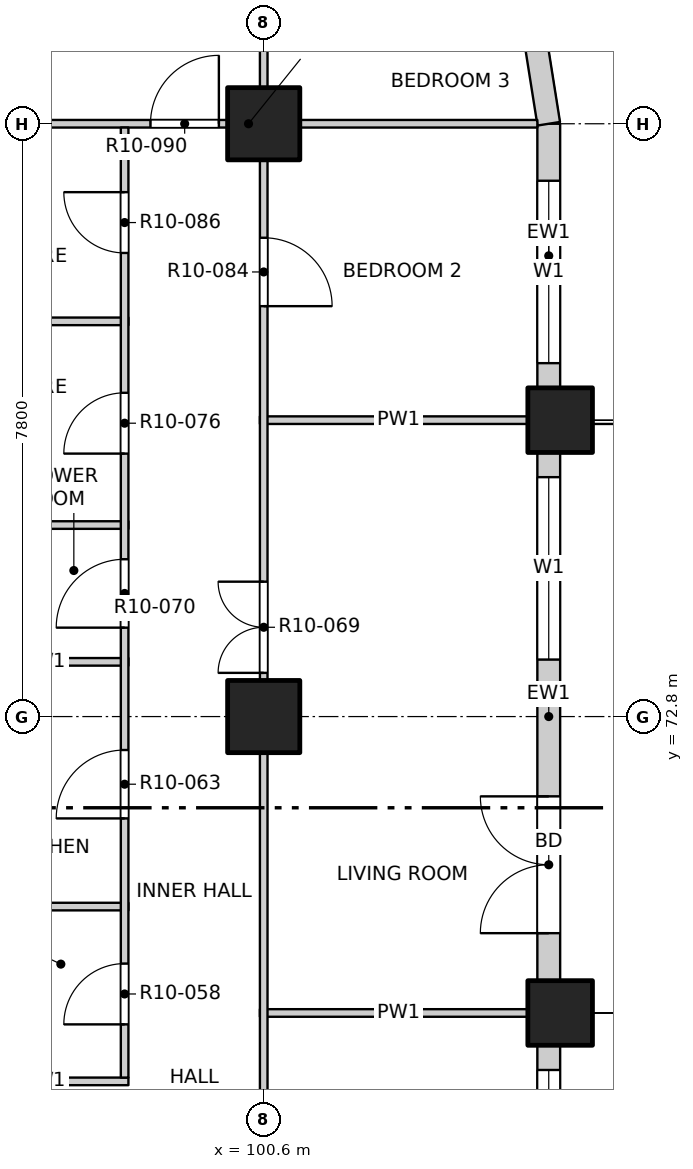
"""IFC4 building model, lengths in metres.
Left out: names, types, materials, properties, quantities, classifications, styles, units other than length and angle.
Written with IfcOpenShell. Run it as: python <this file> out.ifc"""

import sys

from ifc_helpers import new_model, si_unit, direction, frame, frame_2d, origin, origin_2d, place, context, subcontext, project, spatial, rectangle, extrude, element, fill, save


model = new_model("IFC4")
c1 = context("Model", 3, precision=1e-05, world=origin(), true_north=direction((0.0, 1.0)))
c2 = subcontext(c1, "Body", "Model", "MODEL_VIEW")
j1 = project(units=[si_unit("LENGTHUNIT", "METRE"), si_unit("PLANEANGLEUNIT", "RADIAN")], contexts=[c1])
p1 = place(None, origin())
s1 = spatial("IfcSite", under=j1, at=p1, CompositionType="ELEMENT")
p2 = place(p1, origin())
s2 = spatial("IfcBuilding", under=s1, at=p2, CompositionType="ELEMENT")
p3 = place(p2, frame((0.0, 0.0, 123.7)))
s3 = spatial("IfcBuildingStorey", under=s2, at=p3, CompositionType="ELEMENT", Elevation=123.7)
for number, where, z_axis, x_axis in (
    (1, (104.5, 68.9, -0.3), (0.0, 0.0, 1.0), (1.0, 0.0, 0.0)),
    (2, (104.5, 76.7, -0.3), (0.0, 0.0, 1.0), (1.0, 0.0, 0.0)),
):
    element("IfcColumn", number, at=place(p3, frame(where, z_axis=z_axis, x_axis=x_axis)), inside=s3, PredefinedType="COLUMN", context=c2, shape_type="SweptSolid", body=[
        extrude(rectangle(XDim=0.85, YDim=0.85, at=origin_2d()), origin(), (0.0, 0.0, 1.0), 3.45),
    ])
for number, where, z_axis, x_axis in (
    (3, (100.6, 72.8, -0.3), (0.0, 0.0, 1.0), (1.0, 0.0, 0.0)),
    (4, (100.6, 80.6, -0.3), (0.0, 0.0, 1.0), (1.0, 0.0, 0.0)),
):
    element("IfcColumn", number, at=place(p3, frame(where, z_axis=z_axis, x_axis=x_axis)), inside=s3, PredefinedType="COLUMN", context=c2, shape_type="SweptSolid", body=[
        extrude(rectangle(XDim=0.95, YDim=0.95, at=origin_2d()), origin(), (0.0, 0.0, 1.0), 3.45),
    ])
p4 = place(p3, frame((104.35, 61.525, 0.0), z_axis=(0.0, 0.0, 1.0), x_axis=(0.0, 1.0, 0.0)))
e5 = element("IfcWall", 5, at=p4, inside=s3, PredefinedType="SOLIDWALL", context=c2, shape_type="SweptSolid", body=[
    extrude(rectangle(XDim=6.95, YDim=0.3, at=frame_2d((3.475, 0.0))), origin(), (0.0, 0.0, 1.0), 2.7),
])
p5 = place(p4, frame((0.625, 0.0, 0.0)))
e6 = element("IfcOpeningElement", 6, at=p5, cuts=e5, PredefinedType="OPENING", context=c2, shape_type="SweptSolid", body=[
    extrude(rectangle(XDim=1.8, YDim=2.4, at=frame_2d((0.9, 1.2))), frame((0.0, 0.16, 0.0), z_axis=(0.0, -1.0, 0.0), x_axis=(1.0, 0.0, 0.0)), (0.0, 0.0, 1.0), 0.32),
])
p6 = place(p4, frame((4.225, 0.0, 0.9)))
e7 = element("IfcOpeningElement", 7, at=p6, cuts=e5, PredefinedType="OPENING", context=c2, shape_type="SweptSolid", body=[
    extrude(rectangle(XDim=2.4, YDim=1.8, at=frame_2d((1.2, 0.9))), frame((0.0, 0.16, 0.0), z_axis=(0.0, -1.0, 0.0), x_axis=(1.0, 0.0, 0.0)), (0.0, 0.0, 1.0), 0.32),
])
p7 = place(p3, frame((104.35, 69.325, 0.0), z_axis=(0.0, 0.0, 1.0), x_axis=(0.0, 1.0, 0.0)))
e8 = element("IfcWall", 8, at=p7, inside=s3, PredefinedType="SOLIDWALL", context=c2, shape_type="SweptSolid", body=[
    extrude(rectangle(XDim=6.95, YDim=0.3, at=frame_2d((3.475, 0.0))), origin(), (0.0, 0.0, 1.0), 2.7),
])
p8 = place(p7, frame((0.625, 0.0, 0.0)))
e9 = element("IfcOpeningElement", 9, at=p8, cuts=e8, PredefinedType="OPENING", context=c2, shape_type="SweptSolid", body=[
    extrude(rectangle(XDim=1.8, YDim=2.4, at=frame_2d((0.9, 1.2))), frame((0.0, 0.16, 0.0), z_axis=(0.0, -1.0, 0.0), x_axis=(1.0, 0.0, 0.0)), (0.0, 0.0, 1.0), 0.32),
])
p9 = place(p7, frame((4.225, 0.0, 0.9)))
e10 = element("IfcOpeningElement", 10, at=p9, cuts=e8, PredefinedType="OPENING", context=c2, shape_type="SweptSolid", body=[
    extrude(rectangle(XDim=2.4, YDim=1.8, at=frame_2d((1.2, 0.9))), frame((0.0, 0.16, 0.0), z_axis=(0.0, -1.0, 0.0), x_axis=(1.0, 0.0, 0.0)), (0.0, 0.0, 1.0), 0.32),
])
p10 = place(p3, frame((104.35, 77.125, 0.0), z_axis=(0.0, 0.0, 1.0), x_axis=(0.0, 1.0, 0.0)))
e11 = element("IfcWall", 11, at=p10, inside=s3, PredefinedType="SOLIDWALL", context=c2, shape_type="SweptSolid", body=[
    extrude(rectangle(XDim=3.475, YDim=0.3, at=frame_2d((1.738, 0.0))), origin(), (0.0, 0.0, 1.0), 2.7),
])
p11 = place(p10, frame((0.325, 0.0, 0.9)))
e12 = element("IfcOpeningElement", 12, at=p11, cuts=e11, PredefinedType="OPENING", context=c2, shape_type="SweptSolid", body=[
    extrude(rectangle(XDim=2.4, YDim=1.8, at=frame_2d((1.2, 0.9))), frame((0.0, 0.16, 0.0), z_axis=(0.0, -1.0, 0.0), x_axis=(1.0, 0.0, 0.0)), (0.0, 0.0, 1.0), 0.32),
])
p12 = place(p3, frame((104.35, 80.6, 0.0), z_axis=(0.0, 0.0, 1.0), x_axis=(-0.156496880861, 0.987678452879, 0.0)))
e13 = element("IfcWall", 13, at=p12, inside=s3, PredefinedType="SOLIDWALL", context=c2, shape_type="SweptSolid", body=[
    extrude(rectangle(XDim=1.173, YDim=0.3, at=frame_2d((0.586, 0.0))), origin(), (0.0, 0.0, 1.0), 2.7),
])
p13 = place(p3, frame((96.6, 68.0, 0.0), z_axis=(0.0, 0.0, 1.0), x_axis=(1.0, 0.0, 0.0)))
e14 = element("IfcWall", 14, at=p13, inside=s3, PredefinedType="PARTITIONING", context=c2, shape_type="SweptSolid", body=[
    extrude(rectangle(XDim=2.22, YDim=0.1, at=frame_2d((1.11, 0.0))), origin(), (0.0, 0.0, 1.0), 3.15),
])
p14 = place(p3, frame((100.55, 68.9, 0.0), z_axis=(0.0, 0.0, 1.0), x_axis=(1.0, 0.0, 0.0)))
e15 = element("IfcWall", 15, at=p14, inside=s3, PredefinedType="PARTITIONING", context=c2, shape_type="SweptSolid", body=[
    extrude(rectangle(XDim=3.65, YDim=0.1, at=frame_2d((1.825, 0.0))), origin(), (0.0, 0.0, 1.0), 2.55),
])
for number, where, z_axis, x_axis in (
    (16, (96.6, 70.3, 0.0), (0.0, 0.0, 1.0), (1.0, 0.0, 0.0)),
    (17, (96.6, 73.52, 0.0), (0.0, 0.0, 1.0), (1.0, 0.0, 0.0)),
    (18, (96.6, 75.32, 0.0), (0.0, 0.0, 1.0), (1.0, 0.0, 0.0)),
):
    element("IfcWall", number, at=place(p3, frame(where, z_axis=z_axis, x_axis=x_axis)), inside=s3, PredefinedType="PARTITIONING", context=c2, shape_type="SweptSolid", body=[
        extrude(rectangle(XDim=2.22, YDim=0.1, at=frame_2d((1.11, 0.0))), origin(), (0.0, 0.0, 1.0), 3.15),
    ])
p15 = place(p3, frame((100.55, 76.7, 0.0), z_axis=(0.0, 0.0, 1.0), x_axis=(1.0, 0.0, 0.0)))
e19 = element("IfcWall", 19, at=p15, inside=s3, PredefinedType="PARTITIONING", context=c2, shape_type="SweptSolid", body=[
    extrude(rectangle(XDim=3.65, YDim=0.1, at=frame_2d((1.825, 0.0))), origin(), (0.0, 0.0, 1.0), 2.55),
])
p16 = place(p3, frame((96.6, 78.0, 0.0), z_axis=(0.0, 0.0, 1.0), x_axis=(1.0, 0.0, 0.0)))
e20 = element("IfcWall", 20, at=p16, inside=s3, PredefinedType="PARTITIONING", context=c2, shape_type="SweptSolid", body=[
    extrude(rectangle(XDim=2.22, YDim=0.1, at=frame_2d((1.11, 0.0))), origin(), (0.0, 0.0, 1.0), 3.15),
])
p17 = place(p3, frame((96.6, 80.6, 0.0), z_axis=(0.0, 0.0, 1.0), x_axis=(1.0, 0.0, 0.0)))
e21 = element("IfcWall", 21, at=p17, inside=s3, PredefinedType="PARTITIONING", context=c2, shape_type="SweptSolid", body=[
    extrude(rectangle(XDim=7.6, YDim=0.1, at=frame_2d((3.8, 0.0))), origin(), (0.0, 0.0, 1.0), 3.15),
])
p18 = place(p17, frame((2.51, 0.0, 0.0)))
e22 = element("IfcOpeningElement", 22, at=p18, cuts=e21, PredefinedType="OPENING", context=c2, shape_type="SweptSolid", body=[
    extrude(rectangle(XDim=0.9, YDim=2.1, at=frame_2d((0.45, 1.05))), frame((0.0, 0.06, 0.0), z_axis=(0.0, -1.0, 0.0), x_axis=(1.0, 0.0, 0.0)), (0.0, 0.0, 1.0), 0.12),
])
p19 = place(p3, frame((98.77, 68.05, 0.0), z_axis=(0.0, 0.0, 1.0), x_axis=(0.0, 1.0, 0.0)))
e23 = element("IfcWall", 23, at=p19, inside=s3, PredefinedType="PARTITIONING", context=c2, shape_type="SweptSolid", body=[
    extrude(rectangle(XDim=12.5, YDim=0.1, at=frame_2d((6.25, 0.0))), origin(), (0.0, 0.0, 1.0), 3.15),
])
p20 = place(p19, frame((0.7, 0.0, 0.0)))
e24 = element("IfcOpeningElement", 24, at=p20, cuts=e23, PredefinedType="OPENING", context=c2, shape_type="SweptSolid", body=[
    extrude(rectangle(XDim=0.8, YDim=2.1, at=frame_2d((0.4, 1.05))), frame((0.0, 0.06, 0.0), z_axis=(0.0, -1.0, 0.0), x_axis=(1.0, 0.0, 0.0)), (0.0, 0.0, 1.0), 0.12),
])
p21 = place(p19, frame((3.41, 0.0, 0.0)))
e25 = element("IfcOpeningElement", 25, at=p21, cuts=e23, PredefinedType="OPENING", context=c2, shape_type="SweptSolid", body=[
    extrude(rectangle(XDim=0.9, YDim=2.1, at=frame_2d((0.45, 1.05))), frame((0.0, 0.06, 0.0), z_axis=(0.0, -1.0, 0.0), x_axis=(1.0, 0.0, 0.0)), (0.0, 0.0, 1.0), 0.12),
])
p22 = place(p19, frame((5.92, 0.0, 0.0)))
e26 = element("IfcOpeningElement", 26, at=p22, cuts=e23, PredefinedType="OPENING", context=c2, shape_type="SweptSolid", body=[
    extrude(rectangle(XDim=0.9, YDim=2.1, at=frame_2d((0.45, 1.05))), frame((0.0, 0.06, 0.0), z_axis=(0.0, -1.0, 0.0), x_axis=(1.0, 0.0, 0.0)), (0.0, 0.0, 1.0), 0.12),
])
p23 = place(p19, frame((8.21, 0.0, 0.0)))
e27 = element("IfcOpeningElement", 27, at=p23, cuts=e23, PredefinedType="OPENING", context=c2, shape_type="SweptSolid", body=[
    extrude(rectangle(XDim=0.8, YDim=2.1, at=frame_2d((0.4, 1.05))), frame((0.0, 0.06, 0.0), z_axis=(0.0, -1.0, 0.0), x_axis=(1.0, 0.0, 0.0)), (0.0, 0.0, 1.0), 0.12),
])
p24 = place(p19, frame((10.85, 0.0, 0.0)))
e28 = element("IfcOpeningElement", 28, at=p24, cuts=e23, PredefinedType="OPENING", context=c2, shape_type="SweptSolid", body=[
    extrude(rectangle(XDim=0.8, YDim=2.1, at=frame_2d((0.4, 1.05))), frame((0.0, 0.06, 0.0), z_axis=(0.0, -1.0, 0.0), x_axis=(1.0, 0.0, 0.0)), (0.0, 0.0, 1.0), 0.12),
])
p25 = place(p3, frame((100.6, 45.8, 0.0), z_axis=(0.0, 0.0, 1.0), x_axis=(0.0, 1.0, 0.0)))
e29 = element("IfcWall", 29, at=p25, inside=s3, PredefinedType="PARTITIONING", context=c2, shape_type="SweptSolid", body=[
    extrude(rectangle(XDim=38.4, YDim=0.1, at=frame_2d((19.2, 0.0))), origin(), (0.0, 0.0, 1.0), 3.15),
])
p26 = place(p25, frame((1.05, 0.0, 0.0)))
e30 = element("IfcOpeningElement", 30, at=p26, cuts=e29, PredefinedType="OPENING", context=c2, shape_type="SweptSolid", body=[
    extrude(rectangle(XDim=1.2, YDim=2.1, at=frame_2d((0.6, 1.05))), frame((0.0, 0.06, 0.0), z_axis=(0.0, -1.0, 0.0), x_axis=(1.0, 0.0, 0.0)), (0.0, 0.0, 1.0), 0.12),
])
p27 = place(p25, frame((6.9, 0.0, 0.0)))
e31 = element("IfcOpeningElement", 31, at=p27, cuts=e29, PredefinedType="OPENING", context=c2, shape_type="SweptSolid", body=[
    extrude(rectangle(XDim=1.2, YDim=2.1, at=frame_2d((0.6, 1.05))), frame((0.0, 0.06, 0.0), z_axis=(0.0, -1.0, 0.0), x_axis=(1.0, 0.0, 0.0)), (0.0, 0.0, 1.0), 0.12),
])
p28 = place(p25, frame((12.9, 0.0, 0.0)))
e32 = element("IfcOpeningElement", 32, at=p28, cuts=e29, PredefinedType="OPENING", context=c2, shape_type="SweptSolid", body=[
    extrude(rectangle(XDim=0.9, YDim=2.1, at=frame_2d((0.45, 1.05))), frame((0.0, 0.06, 0.0), z_axis=(0.0, -1.0, 0.0), x_axis=(1.0, 0.0, 0.0)), (0.0, 0.0, 1.0), 0.12),
])
p29 = place(p25, frame((16.8, 0.0, 0.0)))
e33 = element("IfcOpeningElement", 33, at=p29, cuts=e29, PredefinedType="OPENING", context=c2, shape_type="SweptSolid", body=[
    extrude(rectangle(XDim=0.9, YDim=2.1, at=frame_2d((0.45, 1.05))), frame((0.0, 0.06, 0.0), z_axis=(0.0, -1.0, 0.0), x_axis=(1.0, 0.0, 0.0)), (0.0, 0.0, 1.0), 0.12),
])
p30 = place(p25, frame((20.7, 0.0, 0.0)))
e34 = element("IfcOpeningElement", 34, at=p30, cuts=e29, PredefinedType="OPENING", context=c2, shape_type="SweptSolid", body=[
    extrude(rectangle(XDim=0.9, YDim=2.1, at=frame_2d((0.45, 1.05))), frame((0.0, 0.06, 0.0), z_axis=(0.0, -1.0, 0.0), x_axis=(1.0, 0.0, 0.0)), (0.0, 0.0, 1.0), 0.12),
])
p31 = place(p25, frame((27.575, 0.0, 0.0)))
e35 = element("IfcOpeningElement", 35, at=p31, cuts=e29, PredefinedType="OPENING", context=c2, shape_type="SweptSolid", body=[
    extrude(rectangle(XDim=1.2, YDim=2.1, at=frame_2d((0.6, 1.05))), frame((0.0, 0.06, 0.0), z_axis=(0.0, -1.0, 0.0), x_axis=(1.0, 0.0, 0.0)), (0.0, 0.0, 1.0), 0.12),
])
p32 = place(p25, frame((32.4, 0.0, 0.0)))
e36 = element("IfcOpeningElement", 36, at=p32, cuts=e29, PredefinedType="OPENING", context=c2, shape_type="SweptSolid", body=[
    extrude(rectangle(XDim=0.9, YDim=2.1, at=frame_2d((0.45, 1.05))), frame((0.0, 0.06, 0.0), z_axis=(0.0, -1.0, 0.0), x_axis=(1.0, 0.0, 0.0)), (0.0, 0.0, 1.0), 0.12),
])
p33 = place(p25, frame((36.15, 0.0, 0.0)))
e37 = element("IfcOpeningElement", 37, at=p33, cuts=e29, PredefinedType="OPENING", context=c2, shape_type="SweptSolid", body=[
    extrude(rectangle(XDim=1.2, YDim=2.1, at=frame_2d((0.6, 1.05))), frame((0.0, 0.06, 0.0), z_axis=(0.0, -1.0, 0.0), x_axis=(1.0, 0.0, 0.0)), (0.0, 0.0, 1.0), 0.12),
])
p34 = place(p6, origin())
e38 = element("IfcWindow", 38, at=p34, inside=s3, PartitioningType="DOUBLE_PANEL_VERTICAL", PredefinedType="WINDOW", context=c2, shape_type="SweptSolid", body=[
    extrude(rectangle(XDim=2.4, YDim=1.8, at=frame_2d((1.2, 0.9))), frame((0.0, 0.03, 0.0), z_axis=(0.0, -1.0, 0.0), x_axis=(1.0, 0.0, 0.0)), (0.0, 0.0, 1.0), 0.06),
])
fill(e7, e38)
p35 = place(p8, origin())
e39 = element("IfcDoor", 39, at=p35, inside=s3, OperationType="DOUBLE_DOOR_SINGLE_SWING", PredefinedType="DOOR", context=c2, shape_type="SweptSolid", body=[
    extrude(rectangle(XDim=1.8, YDim=2.4, at=frame_2d((0.9, 1.2))), frame((0.0, 0.025, 0.0), z_axis=(0.0, -1.0, 0.0), x_axis=(1.0, 0.0, 0.0)), (0.0, 0.0, 1.0), 0.05),
])
fill(e9, e39)
p36 = place(p9, origin())
e40 = element("IfcWindow", 40, at=p36, inside=s3, PartitioningType="DOUBLE_PANEL_VERTICAL", PredefinedType="WINDOW", context=c2, shape_type="SweptSolid", body=[
    extrude(rectangle(XDim=2.4, YDim=1.8, at=frame_2d((1.2, 0.9))), frame((0.0, 0.03, 0.0), z_axis=(0.0, -1.0, 0.0), x_axis=(1.0, 0.0, 0.0)), (0.0, 0.0, 1.0), 0.06),
])
fill(e10, e40)
p37 = place(p11, origin())
e41 = element("IfcWindow", 41, at=p37, inside=s3, PartitioningType="DOUBLE_PANEL_VERTICAL", PredefinedType="WINDOW", context=c2, shape_type="SweptSolid", body=[
    extrude(rectangle(XDim=2.4, YDim=1.8, at=frame_2d((1.2, 0.9))), frame((0.0, 0.03, 0.0), z_axis=(0.0, -1.0, 0.0), x_axis=(1.0, 0.0, 0.0)), (0.0, 0.0, 1.0), 0.06),
])
fill(e12, e41)
p38 = place(p20, origin())
e42 = element("IfcDoor", 42, at=p38, inside=s3, OperationType="SINGLE_SWING_LEFT", PredefinedType="DOOR", context=c2, shape_type="SweptSolid", body=[
    extrude(rectangle(XDim=0.8, YDim=2.1, at=frame_2d((0.4, 1.05))), frame((0.0, 0.025, 0.0), z_axis=(0.0, -1.0, 0.0), x_axis=(1.0, 0.0, 0.0)), (0.0, 0.0, 1.0), 0.05),
])
fill(e24, e42)
p39 = place(p21, origin())
e43 = element("IfcDoor", 43, at=p39, inside=s3, OperationType="SINGLE_SWING_LEFT", PredefinedType="DOOR", context=c2, shape_type="SweptSolid", body=[
    extrude(rectangle(XDim=0.9, YDim=2.1, at=frame_2d((0.45, 1.05))), frame((0.0, 0.025, 0.0), z_axis=(0.0, -1.0, 0.0), x_axis=(1.0, 0.0, 0.0)), (0.0, 0.0, 1.0), 0.05),
])
fill(e25, e43)
p40 = place(p31, origin())
e44 = element("IfcDoor", 44, at=p40, inside=s3, OperationType="DOUBLE_DOOR_SINGLE_SWING", PredefinedType="DOOR", context=c2, shape_type="SweptSolid", body=[
    extrude(rectangle(XDim=1.2, YDim=2.1, at=frame_2d((0.6, 1.05))), frame((0.0, 0.025, 0.0), z_axis=(0.0, -1.0, 0.0), x_axis=(1.0, 0.0, 0.0)), (0.0, 0.0, 1.0), 0.05),
])
fill(e35, e44)
p41 = place(p22, origin())
e45 = element("IfcDoor", 45, at=p41, inside=s3, OperationType="SINGLE_SWING_LEFT", PredefinedType="DOOR", context=c2, shape_type="SweptSolid", body=[
    extrude(rectangle(XDim=0.9, YDim=2.1, at=frame_2d((0.45, 1.05))), frame((0.0, 0.025, 0.0), z_axis=(0.0, -1.0, 0.0), x_axis=(1.0, 0.0, 0.0)), (0.0, 0.0, 1.0), 0.05),
])
fill(e26, e45)
p42 = place(p23, origin())
e46 = element("IfcDoor", 46, at=p42, inside=s3, OperationType="SINGLE_SWING_LEFT", PredefinedType="DOOR", context=c2, shape_type="SweptSolid", body=[
    extrude(rectangle(XDim=0.8, YDim=2.1, at=frame_2d((0.4, 1.05))), frame((0.0, 0.025, 0.0), z_axis=(0.0, -1.0, 0.0), x_axis=(1.0, 0.0, 0.0)), (0.0, 0.0, 1.0), 0.05),
])
fill(e27, e46)
p43 = place(p32, origin())
e47 = element("IfcDoor", 47, at=p43, inside=s3, OperationType="SINGLE_SWING_RIGHT", PredefinedType="DOOR", context=c2, shape_type="SweptSolid", body=[
    extrude(rectangle(XDim=0.9, YDim=2.1, at=frame_2d((0.45, 1.05))), frame((0.0, 0.025, 0.0), z_axis=(0.0, -1.0, 0.0), x_axis=(1.0, 0.0, 0.0)), (0.0, 0.0, 1.0), 0.05),
])
fill(e36, e47)
p44 = place(p24, origin())
e48 = element("IfcDoor", 48, at=p44, inside=s3, OperationType="SINGLE_SWING_RIGHT", PredefinedType="DOOR", context=c2, shape_type="SweptSolid", body=[
    extrude(rectangle(XDim=0.8, YDim=2.1, at=frame_2d((0.4, 1.05))), frame((0.0, 0.025, 0.0), z_axis=(0.0, -1.0, 0.0), x_axis=(1.0, 0.0, 0.0)), (0.0, 0.0, 1.0), 0.05),
])
fill(e28, e48)
p45 = place(p18, origin())
e49 = element("IfcDoor", 49, at=p45, inside=s3, OperationType="SINGLE_SWING_RIGHT", PredefinedType="DOOR", context=c2, shape_type="SweptSolid", body=[
    extrude(rectangle(XDim=0.9, YDim=2.1, at=frame_2d((0.45, 1.05))), frame((0.0, 0.025, 0.0), z_axis=(0.0, -1.0, 0.0), x_axis=(1.0, 0.0, 0.0)), (0.0, 0.0, 1.0), 0.05),
])
fill(e22, e49)
save(model, sys.argv[1])
